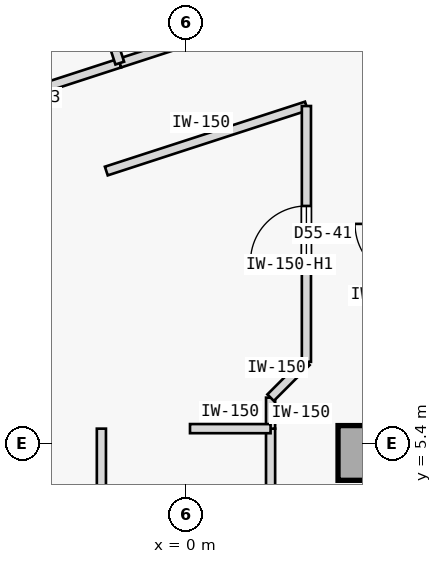
"""IFC4 building model, lengths in metres.
Left out: names, types, materials, properties, quantities, classifications, styles, units other than length and angle.
Written with IfcOpenShell. Run it as: python <this file> out.ifc"""

import sys

from ifc_helpers import new_model, si_unit, direction, frame, frame_2d, origin, origin_2d, place, context, subcontext, project, spatial, rectangle, extrude, element, fill, save


model = new_model("IFC4")
c1 = context("Model", 3, precision=1e-05, world=origin(), true_north=direction((0.0, 1.0)))
c2 = subcontext(c1, "Body", "Model", "MODEL_VIEW")
j1 = project(units=[si_unit("LENGTHUNIT", "METRE"), si_unit("PLANEANGLEUNIT", "RADIAN")], contexts=[c1])
p1 = place(None, origin())
s1 = spatial("IfcSite", under=j1, at=p1, CompositionType="ELEMENT")
p2 = place(p1, origin())
s2 = spatial("IfcBuilding", under=s1, at=p2, CompositionType="ELEMENT")
p3 = place(p2, frame((0.0, 0.0, 210.9)))
s3 = spatial("IfcBuildingStorey", under=s2, at=p3, CompositionType="ELEMENT", Elevation=210.9)
p4 = place(p3, frame((2.95, 5.25, 0.0), z_axis=(0.0, 0.0, 1.0), x_axis=(1.0, 0.0, 0.0)))
e1 = element("IfcColumn", 1, at=p4, inside=s3, PredefinedType="COLUMN", context=c2, shape_type="SweptSolid", body=[
    extrude(rectangle(XDim=0.9, YDim=0.9, at=origin_2d()), origin(), (0.0, 0.0, 1.0), 3.35),
])
p5 = place(p3, frame((-1.391, -5.65, 0.0), z_axis=(0.0, 0.0, 1.0), x_axis=(-8.6422954e-05, 0.999999996266, 0.0)))
e2 = element("IfcWall", 2, at=p5, inside=s3, PredefinedType="PARTITIONING", context=c2, shape_type="SweptSolid", body=[
    extrude(rectangle(XDim=11.3, YDim=0.15, at=frame_2d((5.65, 0.0))), origin(), (0.0, 0.0, 1.0), 3.125),
])
p6 = place(p5, frame((5.175, 0.0, 0.0)))
e3 = element("IfcOpeningElement", 3, at=p6, cuts=e2, PredefinedType="OPENING", context=c2, shape_type="SweptSolid", body=[
    extrude(rectangle(XDim=0.95, YDim=2.15, at=frame_2d((0.475, 1.075))), frame((0.0, 0.085, 0.0), z_axis=(0.0, -1.0, 0.0), x_axis=(1.0, 0.0, 0.0)), (0.0, 0.0, 1.0), 0.17),
])
p7 = place(p3, frame((1.391, -5.648, 0.0), z_axis=(0.0, 0.0, 1.0), x_axis=(-4.3218947e-05, 0.999999999066, 0.0)))
e4 = element("IfcWall", 4, at=p7, inside=s3, PredefinedType="PARTITIONING", context=c2, shape_type="SweptSolid", body=[
    extrude(rectangle(XDim=11.298, YDim=0.15, at=frame_2d((5.649, 0.0))), origin(), (0.0, 0.0, 1.0), 3.125),
])
p8 = place(p3, frame((-4.561, 10.533, 0.0), z_axis=(0.0, 0.0, 1.0), x_axis=(0.951057168147, 0.309014988174, 0.0)))
e5 = element("IfcWall", 5, at=p8, inside=s3, PredefinedType="PARTITIONING", context=c2, shape_type="SweptSolid", body=[
    extrude(rectangle(XDim=3.65, YDim=0.15, at=frame_2d((1.825, 0.0))), origin(), (0.0, 0.0, 1.0), 3.125),
])
p9 = place(p8, frame((1.35, 0.0, 0.0)))
e6 = element("IfcOpeningElement", 6, at=p9, cuts=e5, PredefinedType="OPENING", context=c2, shape_type="SweptSolid", body=[
    extrude(rectangle(XDim=0.95, YDim=2.15, at=frame_2d((0.475, 1.075))), frame((0.0, 0.085, 0.0), z_axis=(0.0, -1.0, 0.0), x_axis=(1.0, 0.0, 0.0)), (0.0, 0.0, 1.0), 0.17),
])
p10 = place(p3, frame((-1.311, 9.886, 0.0), z_axis=(0.0, 0.0, 1.0), x_axis=(0.951068803905, 0.308979174442, 0.0)))
e7 = element("IfcWall", 7, at=p10, inside=s3, PredefinedType="PARTITIONING", context=c2, shape_type="SweptSolid", body=[
    extrude(rectangle(XDim=3.46, YDim=0.15, at=frame_2d((1.73, 0.0))), origin(), (0.0, 0.0, 1.0), 3.125),
])
p11 = place(p3, frame((1.391, 5.649, 0.0), z_axis=(0.0, 0.0, 1.0), x_axis=(0.000957395444, 0.999999541697, 0.0)))
e8 = element("IfcWall", 8, at=p11, inside=s3, PredefinedType="PARTITIONING", context=c2, shape_type="SweptSolid", body=[
    extrude(rectangle(XDim=0.51, YDim=0.15, at=frame_2d((0.255, 0.0))), origin(), (0.0, 0.0, 1.0), 3.125),
])
p12 = place(p3, frame((1.391, 6.159, 0.0), z_axis=(0.0, 0.0, 1.0), x_axis=(0.707106781187, 0.707106781187, 0.0)))
e9 = element("IfcWall", 9, at=p12, inside=s3, PredefinedType="PARTITIONING", context=c2, shape_type="SweptSolid", body=[
    extrude(rectangle(XDim=0.833, YDim=0.15, at=frame_2d((0.417, 0.0))), origin(), (0.0, 0.0, 1.0), 3.125),
])
p13 = place(p3, frame((1.98, 6.748, 0.0), z_axis=(0.0, 0.0, 1.0), x_axis=(0.0, 1.0, 0.0)))
e10 = element("IfcWall", 10, at=p13, inside=s3, PredefinedType="PARTITIONING", context=c2, shape_type="SweptSolid", body=[
    extrude(rectangle(XDim=4.207, YDim=0.15, at=frame_2d((2.104, 0.0))), origin(), (0.0, 0.0, 1.0), 2.675),
])
p14 = place(p13, frame((1.643, 0.0, 0.0)))
e11 = element("IfcOpeningElement", 11, at=p14, cuts=e10, PredefinedType="OPENING", context=c2, shape_type="SweptSolid", body=[
    extrude(rectangle(XDim=0.92, YDim=2.15, at=frame_2d((0.46, 1.075))), frame((0.0, 0.085, 0.0), z_axis=(0.0, -1.0, 0.0), x_axis=(1.0, 0.0, 0.0)), (0.0, 0.0, 1.0), 0.17),
])
p15 = place(p3, frame((-1.089, 11.661, 0.0), z_axis=(0.0, 0.0, 1.0), x_axis=(0.951057158344, 0.309015018346, 0.0)))
e12 = element("IfcWall", 12, at=p15, inside=s3, PredefinedType="PARTITIONING", context=c2, shape_type="SweptSolid", body=[
    extrude(rectangle(XDim=4.118, YDim=0.15, at=frame_2d((2.059, 0.0))), origin(), (0.0, 0.0, 1.0), 3.125),
])
p16 = place(p15, frame((1.599, 0.0, 0.0)))
e13 = element("IfcOpeningElement", 13, at=p16, cuts=e12, PredefinedType="OPENING", context=c2, shape_type="SweptSolid", body=[
    extrude(rectangle(XDim=0.92, YDim=2.15, at=frame_2d((0.46, 1.075))), frame((0.0, 0.085, 0.0), z_axis=(0.0, -1.0, 0.0), x_axis=(1.0, 0.0, 0.0)), (0.0, 0.0, 1.0), 0.17),
])
p17 = place(p3, frame((0.066, 5.65, 0.0), z_axis=(0.0, 0.0, 1.0), x_axis=(0.999999932094, -0.000368527707, 0.0)))
e14 = element("IfcWall", 14, at=p17, inside=s3, PredefinedType="PARTITIONING", context=c2, shape_type="SweptSolid", body=[
    extrude(rectangle(XDim=1.325, YDim=0.15, at=frame_2d((0.663, 0.0))), origin(), (0.0, 0.0, 1.0), 3.125),
])
p18 = place(p3, frame((-1.089, 11.661, 0.0), z_axis=(0.0, 0.0, 1.0), x_axis=(-0.309029230739, 0.951052540372, 0.0)))
e15 = element("IfcWall", 15, at=p18, inside=s3, PredefinedType="PARTITIONING", context=c2, shape_type="SweptSolid", body=[
    extrude(rectangle(XDim=7.284, YDim=0.15, at=frame_2d((3.642, 0.0))), origin(), (0.0, 0.0, 1.0), 3.125),
])
p19 = place(p14, origin())
e16 = element("IfcDoor", 16, at=p19, inside=s3, OperationType="SINGLE_SWING_LEFT", PredefinedType="DOOR", context=c2, shape_type="SweptSolid", body=[
    extrude(rectangle(XDim=0.92, YDim=2.15, at=frame_2d((0.46, 1.075))), frame((0.0, 0.025, 0.0), z_axis=(0.0, -1.0, 0.0), x_axis=(1.0, 0.0, 0.0)), (0.0, 0.0, 1.0), 0.05),
])
fill(e11, e16)
save(model, sys.argv[1])
